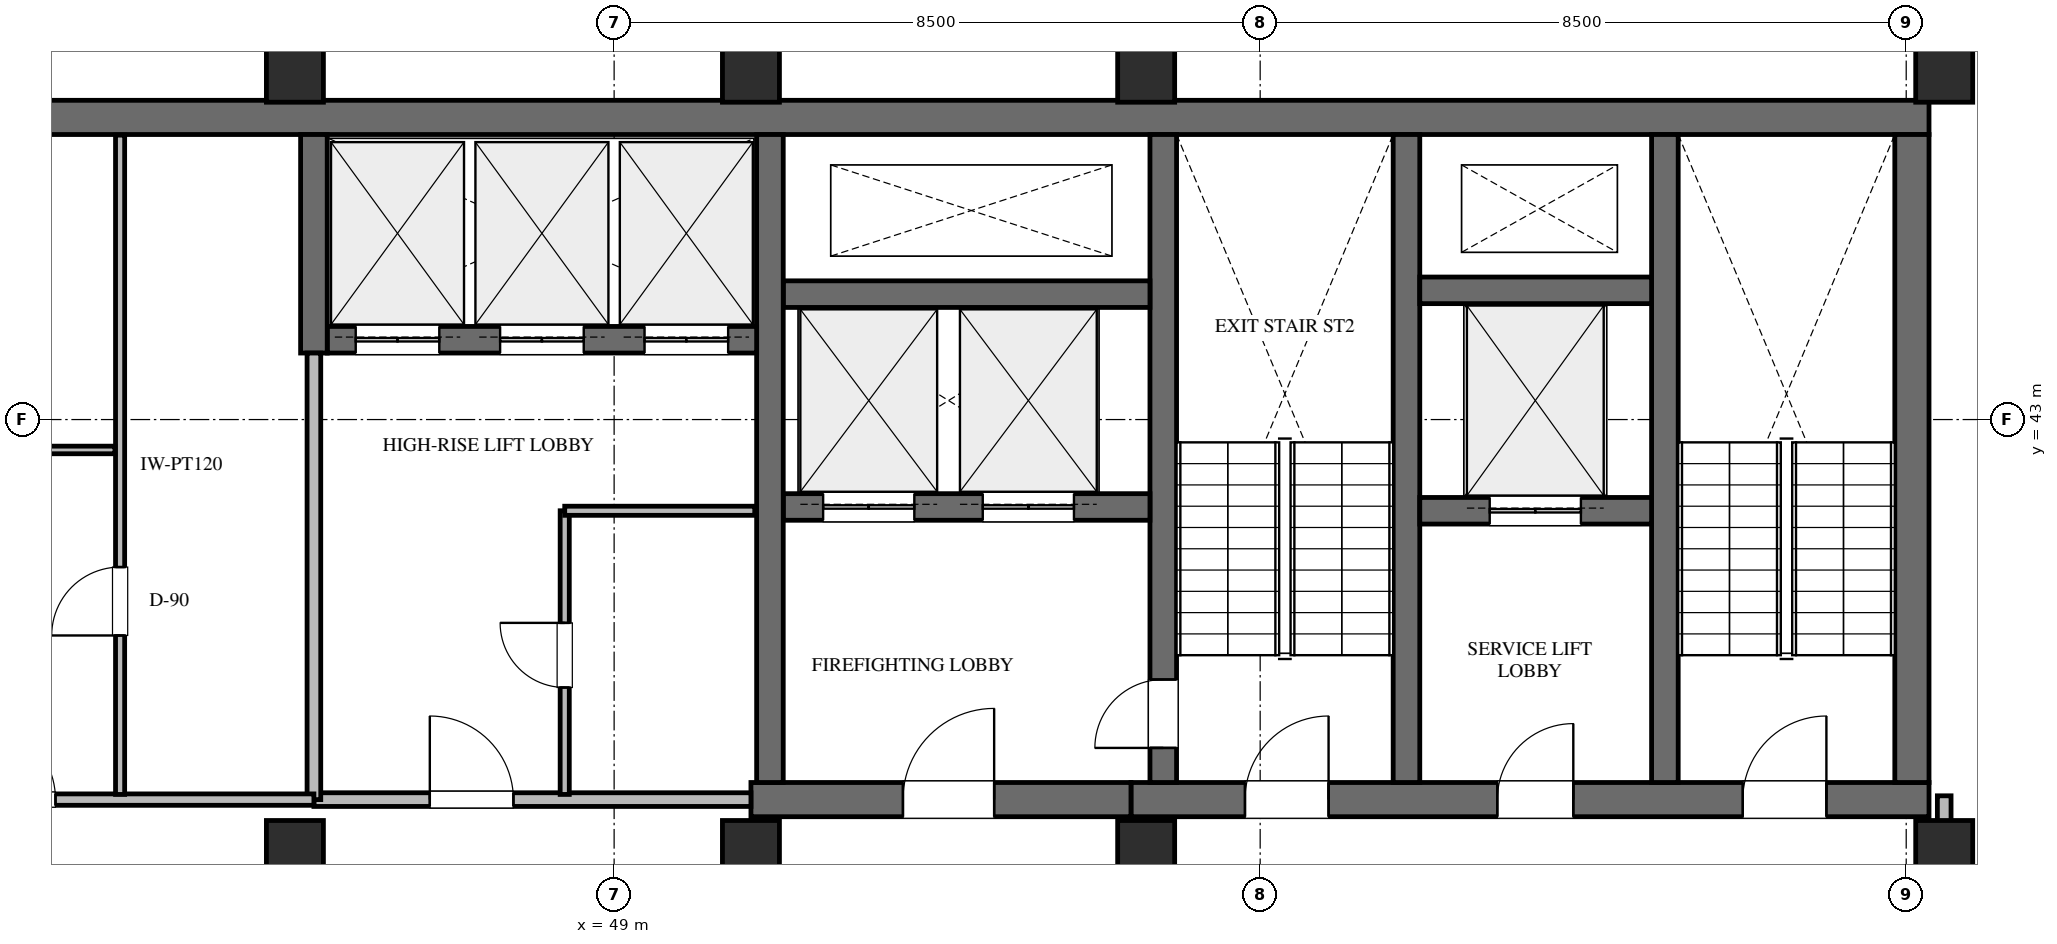
"""IFC4 building model, lengths in metres.
Left out: names, types, materials, properties, quantities, classifications, styles, units other than length and angle.
Written with IfcOpenShell. Run it as: python <this file> out.ifc"""

import sys

from ifc_helpers import new_model, si_unit, direction, frame, frame_2d, origin, origin_2d, place, context, subcontext, project, spatial, rectangle, extrude, element, fill, save


model = new_model("IFC4")
c1 = context("Model", 3, precision=1e-05, world=origin(), true_north=direction((0.0, 1.0)))
c2 = subcontext(c1, "Body", "Model", "MODEL_VIEW")
j1 = project(units=[si_unit("LENGTHUNIT", "METRE"), si_unit("PLANEANGLEUNIT", "RADIAN")], contexts=[c1])
p1 = place(None, origin())
s1 = spatial("IfcSite", under=j1, at=p1, CompositionType="ELEMENT")
p2 = place(p1, origin())
s2 = spatial("IfcBuilding", under=s1, at=p2, CompositionType="ELEMENT")
p3 = place(p2, frame((0.0, 0.0, 231.0)))
s3 = spatial("IfcBuildingStorey", under=s2, at=p3, CompositionType="ELEMENT", Elevation=231.0)
p4 = place(p3, frame((22.9, 46.975, 0.0), z_axis=(0.0, 0.0, 1.0), x_axis=(1.0, 0.0, 0.0)))
e1 = element("IfcWall", 1, at=p4, inside=s3, PredefinedType="SHEAR", context=c2, shape_type="SweptSolid", body=[
    extrude(rectangle(XDim=43.4, YDim=0.45, at=frame_2d((21.7, 0.0))), origin(), (0.0, 0.0, 1.0), 3.6),
])
p5 = place(p3, frame((55.8, 38.0, 0.0), z_axis=(0.0, 0.0, 1.0), x_axis=(1.0, 0.0, 0.0)))
e2 = element("IfcWall", 2, at=p5, inside=s3, PredefinedType="SHEAR", context=c2, shape_type="SweptSolid", body=[
    extrude(rectangle(XDim=10.5, YDim=0.45, at=frame_2d((5.25, 0.0))), origin(), (0.0, 0.0, 1.0), 3.6),
])
p6 = place(p5, frame((1.5, 0.0, 0.0)))
e3 = element("IfcOpeningElement", 3, at=p6, cuts=e2, PredefinedType="OPENING", context=c2, shape_type="SweptSolid", body=[
    extrude(rectangle(XDim=1.1, YDim=2.2, at=frame_2d((0.55, 1.1))), frame((0.0, 0.235, 0.0), z_axis=(0.0, -1.0, 0.0), x_axis=(1.0, 0.0, 0.0)), (0.0, 0.0, 1.0), 0.47),
])
p7 = place(p5, frame((4.82, 0.0, 0.0)))
e4 = element("IfcOpeningElement", 4, at=p7, cuts=e2, PredefinedType="OPENING", context=c2, shape_type="SweptSolid", body=[
    extrude(rectangle(XDim=1.0, YDim=2.15, at=frame_2d((0.5, 1.075))), frame((0.0, 0.235, 0.0), z_axis=(0.0, -1.0, 0.0), x_axis=(1.0, 0.0, 0.0)), (0.0, 0.0, 1.0), 0.47),
])
p8 = place(p5, frame((8.05, 0.0, 0.0)))
e5 = element("IfcOpeningElement", 5, at=p8, cuts=e2, PredefinedType="OPENING", context=c2, shape_type="SweptSolid", body=[
    extrude(rectangle(XDim=1.1, YDim=2.2, at=frame_2d((0.55, 1.1))), frame((0.0, 0.235, 0.0), z_axis=(0.0, -1.0, 0.0), x_axis=(1.0, 0.0, 0.0)), (0.0, 0.0, 1.0), 0.47),
])
p9 = place(p3, frame((66.075, 38.225, 0.0), z_axis=(0.0, 0.0, 1.0), x_axis=(0.0, 1.0, 0.0)))
e6 = element("IfcWall", 6, at=p9, inside=s3, PredefinedType="SHEAR", context=c2, shape_type="SweptSolid", body=[
    extrude(rectangle(XDim=8.525, YDim=0.45, at=frame_2d((4.262, 0.0))), origin(), (0.0, 0.0, 1.0), 3.6),
])
for number, where, z_axis, x_axis in (
    (7, (62.825, 38.225, 0.0), (0.0, 0.0, 1.0), (0.0, 1.0, 0.0)),
    (8, (59.425, 38.225, 0.0), (0.0, 0.0, 1.0), (0.0, 1.0, 0.0)),
):
    element("IfcWall", number, at=place(p3, frame(where, z_axis=z_axis, x_axis=x_axis)), inside=s3, PredefinedType="SHEAR", context=c2, shape_type="SweptSolid", body=[
        extrude(rectangle(XDim=8.525, YDim=0.35, at=frame_2d((4.262, 0.0))), origin(), (0.0, 0.0, 1.0), 3.6),
    ])
p10 = place(p3, frame((56.225, 38.225, 0.0), z_axis=(0.0, 0.0, 1.0), x_axis=(0.0, 1.0, 0.0)))
e9 = element("IfcWall", 9, at=p10, inside=s3, PredefinedType="SHEAR", context=c2, shape_type="SweptSolid", body=[
    extrude(rectangle(XDim=8.525, YDim=0.35, at=frame_2d((4.262, 0.0))), origin(), (0.0, 0.0, 1.0), 3.6),
])
p11 = place(p10, frame((0.455, 0.0, 0.0)))
e10 = element("IfcOpeningElement", 10, at=p11, cuts=e9, PredefinedType="OPENING", context=c2, shape_type="SweptSolid", body=[
    extrude(rectangle(XDim=0.9, YDim=2.15, at=frame_2d((0.45, 1.075))), frame((0.0, 0.185, 0.0), z_axis=(0.0, -1.0, 0.0), x_axis=(1.0, 0.0, 0.0)), (0.0, 0.0, 1.0), 0.37),
])
p12 = place(p3, frame((59.6, 41.8, 0.0), z_axis=(0.0, 0.0, 1.0), x_axis=(1.0, 0.0, 0.0)))
e11 = element("IfcWall", 11, at=p12, inside=s3, PredefinedType="SHEAR", context=c2, shape_type="SweptSolid", body=[
    extrude(rectangle(XDim=3.05, YDim=0.35, at=frame_2d((1.525, 0.0))), origin(), (0.0, 0.0, 1.0), 3.6),
])
p13 = place(p12, frame((0.92, 0.0, 0.0)))
e12 = element("IfcOpeningElement", 12, at=p13, cuts=e11, PredefinedType="OPENING", context=c2, shape_type="SweptSolid", body=[
    extrude(rectangle(XDim=1.2, YDim=2.2, at=frame_2d((0.6, 1.1))), frame((0.0, 0.185, 0.0), z_axis=(0.0, -1.0, 0.0), x_axis=(1.0, 0.0, 0.0)), (0.0, 0.0, 1.0), 0.37),
])
p14 = place(p3, frame((59.6, 44.7, 0.0), z_axis=(0.0, 0.0, 1.0), x_axis=(1.0, 0.0, 0.0)))
e13 = element("IfcWall", 13, at=p14, inside=s3, PredefinedType="SHEAR", context=c2, shape_type="SweptSolid", body=[
    extrude(rectangle(XDim=3.05, YDim=0.35, at=frame_2d((1.525, 0.0))), origin(), (0.0, 0.0, 1.0), 3.6),
])
p15 = place(p3, frame((50.8, 38.0, 0.0), z_axis=(0.0, 0.0, 1.0), x_axis=(1.0, 0.0, 0.0)))
e14 = element("IfcWall", 14, at=p15, inside=s3, PredefinedType="SHEAR", context=c2, shape_type="SweptSolid", body=[
    extrude(rectangle(XDim=5.0, YDim=0.45, at=frame_2d((2.5, 0.0))), origin(), (0.0, 0.0, 1.0), 3.6),
])
p16 = place(p15, frame((2.0, 0.0, 0.0)))
e15 = element("IfcOpeningElement", 15, at=p16, cuts=e14, PredefinedType="OPENING", context=c2, shape_type="SweptSolid", body=[
    extrude(rectangle(XDim=1.2, YDim=2.2, at=frame_2d((0.6, 1.1))), frame((0.0, 0.235, 0.0), z_axis=(0.0, -1.0, 0.0), x_axis=(1.0, 0.0, 0.0)), (0.0, 0.0, 1.0), 0.47),
])
p17 = place(p3, frame((51.225, 41.85, 0.0), z_axis=(0.0, 0.0, 1.0), x_axis=(1.0, 0.0, 0.0)))
e16 = element("IfcWall", 16, at=p17, inside=s3, PredefinedType="SHEAR", context=c2, shape_type="SweptSolid", body=[
    extrude(rectangle(XDim=4.825, YDim=0.35, at=frame_2d((2.413, 0.0))), origin(), (0.0, 0.0, 1.0), 3.6),
])
p18 = place(p17, frame((0.525, 0.0, 0.0)))
e17 = element("IfcOpeningElement", 17, at=p18, cuts=e16, PredefinedType="OPENING", context=c2, shape_type="SweptSolid", body=[
    extrude(rectangle(XDim=1.2, YDim=2.2, at=frame_2d((0.6, 1.1))), frame((0.0, 0.185, 0.0), z_axis=(0.0, -1.0, 0.0), x_axis=(1.0, 0.0, 0.0)), (0.0, 0.0, 1.0), 0.37),
])
p19 = place(p17, frame((2.625, 0.0, 0.0)))
e18 = element("IfcOpeningElement", 18, at=p19, cuts=e16, PredefinedType="OPENING", context=c2, shape_type="SweptSolid", body=[
    extrude(rectangle(XDim=1.2, YDim=2.2, at=frame_2d((0.6, 1.1))), frame((0.0, 0.185, 0.0), z_axis=(0.0, -1.0, 0.0), x_axis=(1.0, 0.0, 0.0)), (0.0, 0.0, 1.0), 0.37),
])
p20 = place(p3, frame((51.225, 44.65, 0.0), z_axis=(0.0, 0.0, 1.0), x_axis=(1.0, 0.0, 0.0)))
e19 = element("IfcWall", 19, at=p20, inside=s3, PredefinedType="SHEAR", context=c2, shape_type="SweptSolid", body=[
    extrude(rectangle(XDim=4.825, YDim=0.35, at=frame_2d((2.413, 0.0))), origin(), (0.0, 0.0, 1.0), 3.6),
])
p21 = place(p3, frame((51.05, 38.225, 0.0), z_axis=(0.0, 0.0, 1.0), x_axis=(0.0, 1.0, 0.0)))
e20 = element("IfcWall", 20, at=p21, inside=s3, PredefinedType="SHEAR", context=c2, shape_type="SweptSolid", body=[
    extrude(rectangle(XDim=8.525, YDim=0.35, at=frame_2d((4.262, 0.0))), origin(), (0.0, 0.0, 1.0), 3.6),
])
p22 = place(p3, frame((45.225, 44.05, 0.0), z_axis=(0.0, 0.0, 1.0), x_axis=(1.0, 0.0, 0.0)))
e21 = element("IfcWall", 21, at=p22, inside=s3, PredefinedType="SHEAR", context=c2, shape_type="SweptSolid", body=[
    extrude(rectangle(XDim=5.65, YDim=0.35, at=frame_2d((2.825, 0.0))), origin(), (0.0, 0.0, 1.0), 3.6),
])
p23 = place(p22, frame((0.375, 0.0, 0.0)))
e22 = element("IfcOpeningElement", 22, at=p23, cuts=e21, PredefinedType="OPENING", context=c2, shape_type="SweptSolid", body=[
    extrude(rectangle(XDim=1.1, YDim=2.2, at=frame_2d((0.55, 1.1))), frame((0.0, 0.185, 0.0), z_axis=(0.0, -1.0, 0.0), x_axis=(1.0, 0.0, 0.0)), (0.0, 0.0, 1.0), 0.37),
])
p24 = place(p22, frame((2.275, 0.0, 0.0)))
e23 = element("IfcOpeningElement", 23, at=p24, cuts=e21, PredefinedType="OPENING", context=c2, shape_type="SweptSolid", body=[
    extrude(rectangle(XDim=1.1, YDim=2.2, at=frame_2d((0.55, 1.1))), frame((0.0, 0.185, 0.0), z_axis=(0.0, -1.0, 0.0), x_axis=(1.0, 0.0, 0.0)), (0.0, 0.0, 1.0), 0.37),
])
p25 = place(p22, frame((4.175, 0.0, 0.0)))
e24 = element("IfcOpeningElement", 24, at=p25, cuts=e21, PredefinedType="OPENING", context=c2, shape_type="SweptSolid", body=[
    extrude(rectangle(XDim=1.1, YDim=2.2, at=frame_2d((0.55, 1.1))), frame((0.0, 0.185, 0.0), z_axis=(0.0, -1.0, 0.0), x_axis=(1.0, 0.0, 0.0)), (0.0, 0.0, 1.0), 0.37),
])
p26 = place(p3, frame((45.05, 43.875, 0.0), z_axis=(0.0, 0.0, 1.0), x_axis=(0.0, 1.0, 0.0)))
e25 = element("IfcWall", 25, at=p26, inside=s3, PredefinedType="SHEAR", context=c2, shape_type="SweptSolid", body=[
    extrude(rectangle(XDim=2.875, YDim=0.35, at=frame_2d((1.438, 0.0))), origin(), (0.0, 0.0, 1.0), 3.6),
])
for number, where, z_axis, x_axis in (
    (26, (66.5, 47.55, 0.0), (0.0, 0.0, 1.0), (1.0, 0.0, 0.0)),
    (27, (56.0, 47.55, 0.0), (0.0, 0.0, 1.0), (1.0, 0.0, 0.0)),
    (28, (66.5, 37.35, 0.0), (0.0, 0.0, 1.0), (1.0, 0.0, 0.0)),
    (29, (56.0, 37.35, 0.0), (0.0, 0.0, 1.0), (1.0, 0.0, 0.0)),
    (30, (50.8, 47.55, 0.0), (0.0, 0.0, 1.0), (1.0, 0.0, 0.0)),
    (31, (50.8, 37.35, 0.0), (0.0, 0.0, 1.0), (1.0, 0.0, 0.0)),
    (32, (44.8, 37.35, 0.0), (0.0, 0.0, 1.0), (1.0, 0.0, 0.0)),
    (33, (44.8, 47.55, 0.0), (0.0, 0.0, 1.0), (1.0, 0.0, 0.0)),
):
    element("IfcColumn", number, at=place(p3, frame(where, z_axis=z_axis, x_axis=x_axis)), inside=s3, PredefinedType="COLUMN", context=c2, shape_type="SweptSolid", body=[
        extrude(rectangle(XDim=0.75, YDim=0.75, at=origin_2d()), origin(), (0.0, 0.0, 1.0), 3.6),
    ])
p27 = place(p3, frame((45.05, 38.0, 0.0), z_axis=(0.0, 0.0, 1.0), x_axis=(1.0, 0.0, 0.0)))
e34 = element("IfcWall", 34, at=p27, inside=s3, PredefinedType="STANDARD", context=c2, shape_type="SweptSolid", body=[
    extrude(rectangle(XDim=5.75, YDim=0.18, at=frame_2d((2.875, 0.0))), origin(), (0.0, 0.0, 1.0), 2.664),
])
p28 = place(p27, frame((1.525, 0.0, 0.0)))
e35 = element("IfcOpeningElement", 35, at=p28, cuts=e34, PredefinedType="OPENING", context=c2, shape_type="SweptSolid", body=[
    extrude(rectangle(XDim=1.1, YDim=2.2, at=frame_2d((0.55, 1.1))), frame((0.0, 0.1, 0.0), z_axis=(0.0, -1.0, 0.0), x_axis=(1.0, 0.0, 0.0)), (0.0, 0.0, 1.0), 0.2),
])
p29 = place(p3, frame((48.35, 38.068, 0.0), z_axis=(0.0, 0.0, 1.0), x_axis=(0.0, 1.0, 0.0)))
e36 = element("IfcWall", 36, at=p29, inside=s3, PredefinedType="PARTITIONING", context=c2, shape_type="SweptSolid", body=[
    extrude(rectangle(XDim=3.732, YDim=0.12, at=frame_2d((1.866, 0.0))), origin(), (0.0, 0.0, 1.0), 3.36),
])
p30 = place(p29, frame((1.407, 0.0, 0.0)))
e37 = element("IfcOpeningElement", 37, at=p30, cuts=e36, PredefinedType="OPENING", context=c2, shape_type="SweptSolid", body=[
    extrude(rectangle(XDim=0.85, YDim=2.1, at=frame_2d((0.425, 1.05))), frame((0.0, 0.07, 0.0), z_axis=(0.0, -1.0, 0.0), x_axis=(1.0, 0.0, 0.0)), (0.0, 0.0, 1.0), 0.14),
])
p31 = place(p3, frame((48.35, 41.8, 0.0), z_axis=(0.0, 0.0, 1.0), x_axis=(1.0, 0.0, 0.0)))
e38 = element("IfcWall", 38, at=p31, inside=s3, PredefinedType="PARTITIONING", context=c2, shape_type="SweptSolid", body=[
    extrude(rectangle(XDim=2.5, YDim=0.12, at=frame_2d((1.25, 0.0))), origin(), (0.0, 0.0, 1.0), 2.664),
])
p32 = place(p3, frame((45.05, 38.0, 0.0), z_axis=(0.0, 0.0, 1.0), x_axis=(0.0, 1.0, 0.0)))
e39 = element("IfcWall", 39, at=p32, inside=s3, PredefinedType="STANDARD", context=c2, shape_type="SweptSolid", body=[
    extrude(rectangle(XDim=5.875, YDim=0.18, at=frame_2d((2.938, 0.0))), origin(), (0.0, 0.0, 1.0), 2.664),
])
p33 = place(p3, frame((27.05, 38.0, 0.0), z_axis=(0.0, 0.0, 1.0), x_axis=(1.0, 0.0, 0.0)))
e40 = element("IfcWall", 40, at=p33, inside=s3, PredefinedType="PARTITIONING", context=c2, shape_type="SweptSolid", body=[
    extrude(rectangle(XDim=18.0, YDim=0.15, at=frame_2d((9.0, 0.0))), origin(), (0.0, 0.0, 1.0), 2.664),
])
p34 = place(p33, frame((13.55, 0.0, 0.0)))
e41 = element("IfcOpeningElement", 41, at=p34, cuts=e40, PredefinedType="OPENING", context=c2, shape_type="SweptSolid", body=[
    extrude(rectangle(XDim=1.05, YDim=2.2, at=frame_2d((0.525, 1.1))), frame((0.0, 0.085, 0.0), z_axis=(0.0, -1.0, 0.0), x_axis=(1.0, 0.0, 0.0)), (0.0, 0.0, 1.0), 0.17),
])
p35 = place(p3, frame((42.5, 38.068, 0.0), z_axis=(0.0, 0.0, 1.0), x_axis=(0.0, 1.0, 0.0)))
e42 = element("IfcWall", 42, at=p35, inside=s3, PredefinedType="PARTITIONING", context=c2, shape_type="SweptSolid", body=[
    extrude(rectangle(XDim=8.674, YDim=0.12, at=frame_2d((4.337, 0.0))), origin(), (0.0, 0.0, 1.0), 3.36),
])
p36 = place(p35, frame((2.091, 0.0, 0.0)))
e43 = element("IfcOpeningElement", 43, at=p36, cuts=e42, PredefinedType="OPENING", context=c2, shape_type="SweptSolid", body=[
    extrude(rectangle(XDim=0.9, YDim=2.1, at=frame_2d((0.45, 1.05))), frame((0.0, 0.07, 0.0), z_axis=(0.0, -1.0, 0.0), x_axis=(1.0, 0.0, 0.0)), (0.0, 0.0, 1.0), 0.14),
])
p37 = place(p3, frame((26.918, 42.6, 0.0), z_axis=(0.0, 0.0, 1.0), x_axis=(1.0, 0.0, 0.0)))
e44 = element("IfcWall", 44, at=p37, inside=s3, PredefinedType="PARTITIONING", context=c2, shape_type="SweptSolid", body=[
    extrude(rectangle(XDim=15.514, YDim=0.1, at=frame_2d((7.757, 0.0))), origin(), (0.0, 0.0, 1.0), 2.664),
])
p38 = place(p37, frame((7.307, 0.0, 0.0)))
e45 = element("IfcOpeningElement", 45, at=p38, cuts=e44, PredefinedType="OPENING", context=c2, shape_type="SweptSolid", body=[
    extrude(rectangle(XDim=0.9, YDim=2.1, at=frame_2d((0.45, 1.05))), frame((0.0, 0.06, 0.0), z_axis=(0.0, -1.0, 0.0), x_axis=(1.0, 0.0, 0.0)), (0.0, 0.0, 1.0), 0.12),
])
p39 = place(p3, frame((66.5, 34.468, 0.0), z_axis=(0.0, 0.0, 1.0), x_axis=(0.0, 1.0, 0.0)))
e46 = element("IfcWall", 46, at=p39, inside=s3, PredefinedType="STANDARD", context=c2, shape_type="SweptSolid", body=[
    extrude(rectangle(XDim=3.582, YDim=0.18, at=frame_2d((1.791, 0.0))), origin(), (0.0, 0.0, 1.0), 2.664),
])
p40 = place(p6, origin())
e47 = element("IfcDoor", 47, at=p40, inside=s3, OperationType="SINGLE_SWING_RIGHT", PredefinedType="DOOR", context=c2, shape_type="SweptSolid", body=[
    extrude(rectangle(XDim=1.1, YDim=2.2, at=frame_2d((0.55, 1.1))), frame((0.0, 0.025, 0.0), z_axis=(0.0, -1.0, 0.0), x_axis=(1.0, 0.0, 0.0)), (0.0, 0.0, 1.0), 0.05),
])
fill(e3, e47)
p41 = place(p7, origin())
e48 = element("IfcDoor", 48, at=p41, inside=s3, OperationType="SINGLE_SWING_RIGHT", PredefinedType="DOOR", context=c2, shape_type="SweptSolid", body=[
    extrude(rectangle(XDim=1.0, YDim=2.15, at=frame_2d((0.5, 1.075))), frame((0.0, 0.025, 0.0), z_axis=(0.0, -1.0, 0.0), x_axis=(1.0, 0.0, 0.0)), (0.0, 0.0, 1.0), 0.05),
])
fill(e4, e48)
p42 = place(p8, origin())
e49 = element("IfcDoor", 49, at=p42, inside=s3, OperationType="SINGLE_SWING_RIGHT", PredefinedType="DOOR", context=c2, shape_type="SweptSolid", body=[
    extrude(rectangle(XDim=1.1, YDim=2.2, at=frame_2d((0.55, 1.1))), frame((0.0, 0.025, 0.0), z_axis=(0.0, -1.0, 0.0), x_axis=(1.0, 0.0, 0.0)), (0.0, 0.0, 1.0), 0.05),
])
fill(e5, e49)
p43 = place(p16, origin())
e50 = element("IfcDoor", 50, at=p43, inside=s3, OperationType="SINGLE_SWING_RIGHT", PredefinedType="DOOR", context=c2, shape_type="SweptSolid", body=[
    extrude(rectangle(XDim=1.2, YDim=2.2, at=frame_2d((0.6, 1.1))), frame((0.0, 0.025, 0.0), z_axis=(0.0, -1.0, 0.0), x_axis=(1.0, 0.0, 0.0)), (0.0, 0.0, 1.0), 0.05),
])
fill(e15, e50)
p44 = place(p11, origin())
e51 = element("IfcDoor", 51, at=p44, inside=s3, OperationType="SINGLE_SWING_LEFT", PredefinedType="DOOR", context=c2, shape_type="SweptSolid", body=[
    extrude(rectangle(XDim=0.9, YDim=2.15, at=frame_2d((0.45, 1.075))), frame((0.0, 0.025, 0.0), z_axis=(0.0, -1.0, 0.0), x_axis=(1.0, 0.0, 0.0)), (0.0, 0.0, 1.0), 0.05),
])
fill(e10, e51)
p45 = place(p23, origin())
e52 = element("IfcDoor", 52, at=p45, inside=s3, OperationType="DOUBLE_DOOR_SLIDING", PredefinedType="DOOR", context=c2, shape_type="SweptSolid", body=[
    extrude(rectangle(XDim=1.1, YDim=2.2, at=frame_2d((0.55, 1.1))), frame((0.0, 0.025, 0.0), z_axis=(0.0, -1.0, 0.0), x_axis=(1.0, 0.0, 0.0)), (0.0, 0.0, 1.0), 0.05),
])
fill(e22, e52)
p46 = place(p24, origin())
e53 = element("IfcDoor", 53, at=p46, inside=s3, OperationType="DOUBLE_DOOR_SLIDING", PredefinedType="DOOR", context=c2, shape_type="SweptSolid", body=[
    extrude(rectangle(XDim=1.1, YDim=2.2, at=frame_2d((0.55, 1.1))), frame((0.0, 0.025, 0.0), z_axis=(0.0, -1.0, 0.0), x_axis=(1.0, 0.0, 0.0)), (0.0, 0.0, 1.0), 0.05),
])
fill(e23, e53)
p47 = place(p25, origin())
e54 = element("IfcDoor", 54, at=p47, inside=s3, OperationType="DOUBLE_DOOR_SLIDING", PredefinedType="DOOR", context=c2, shape_type="SweptSolid", body=[
    extrude(rectangle(XDim=1.1, YDim=2.2, at=frame_2d((0.55, 1.1))), frame((0.0, 0.025, 0.0), z_axis=(0.0, -1.0, 0.0), x_axis=(1.0, 0.0, 0.0)), (0.0, 0.0, 1.0), 0.05),
])
fill(e24, e54)
p48 = place(p18, origin())
e55 = element("IfcDoor", 55, at=p48, inside=s3, OperationType="DOUBLE_DOOR_SLIDING", PredefinedType="DOOR", context=c2, shape_type="SweptSolid", body=[
    extrude(rectangle(XDim=1.2, YDim=2.2, at=frame_2d((0.6, 1.1))), frame((0.0, 0.025, 0.0), z_axis=(0.0, -1.0, 0.0), x_axis=(1.0, 0.0, 0.0)), (0.0, 0.0, 1.0), 0.05),
])
fill(e17, e55)
p49 = place(p19, origin())
e56 = element("IfcDoor", 56, at=p49, inside=s3, OperationType="DOUBLE_DOOR_SLIDING", PredefinedType="DOOR", context=c2, shape_type="SweptSolid", body=[
    extrude(rectangle(XDim=1.2, YDim=2.2, at=frame_2d((0.6, 1.1))), frame((0.0, 0.025, 0.0), z_axis=(0.0, -1.0, 0.0), x_axis=(1.0, 0.0, 0.0)), (0.0, 0.0, 1.0), 0.05),
])
fill(e18, e56)
p50 = place(p13, origin())
e57 = element("IfcDoor", 57, at=p50, inside=s3, OperationType="DOUBLE_DOOR_SLIDING", PredefinedType="DOOR", context=c2, shape_type="SweptSolid", body=[
    extrude(rectangle(XDim=1.2, YDim=2.2, at=frame_2d((0.6, 1.1))), frame((0.0, 0.025, 0.0), z_axis=(0.0, -1.0, 0.0), x_axis=(1.0, 0.0, 0.0)), (0.0, 0.0, 1.0), 0.05),
])
fill(e12, e57)
p51 = place(p28, origin())
e58 = element("IfcDoor", 58, at=p51, inside=s3, OperationType="SINGLE_SWING_LEFT", PredefinedType="DOOR", context=c2, shape_type="SweptSolid", body=[
    extrude(rectangle(XDim=1.1, YDim=2.2, at=frame_2d((0.55, 1.1))), frame((0.0, 0.025, 0.0), z_axis=(0.0, -1.0, 0.0), x_axis=(1.0, 0.0, 0.0)), (0.0, 0.0, 1.0), 0.05),
])
fill(e35, e58)
p52 = place(p30, origin())
e59 = element("IfcDoor", 59, at=p52, inside=s3, OperationType="SINGLE_SWING_RIGHT", PredefinedType="DOOR", context=c2, shape_type="SweptSolid", body=[
    extrude(rectangle(XDim=0.85, YDim=2.1, at=frame_2d((0.425, 1.05))), frame((0.0, 0.025, 0.0), z_axis=(0.0, -1.0, 0.0), x_axis=(1.0, 0.0, 0.0)), (0.0, 0.0, 1.0), 0.05),
])
fill(e37, e59)
p53 = place(p34, origin())
e60 = element("IfcDoor", 60, at=p53, inside=s3, OperationType="SINGLE_SWING_LEFT", PredefinedType="DOOR", context=c2, shape_type="SweptSolid", body=[
    extrude(rectangle(XDim=1.05, YDim=2.2, at=frame_2d((0.525, 1.1))), frame((0.0, 0.025, 0.0), z_axis=(0.0, -1.0, 0.0), x_axis=(1.0, 0.0, 0.0)), (0.0, 0.0, 1.0), 0.05),
])
fill(e41, e60)
p54 = place(p36, origin())
e61 = element("IfcDoor", 61, at=p54, inside=s3, OperationType="SINGLE_SWING_LEFT", PredefinedType="DOOR", context=c2, shape_type="SweptSolid", body=[
    extrude(rectangle(XDim=0.9, YDim=2.1, at=frame_2d((0.45, 1.05))), frame((0.0, 0.025, 0.0), z_axis=(0.0, -1.0, 0.0), x_axis=(1.0, 0.0, 0.0)), (0.0, 0.0, 1.0), 0.05),
])
fill(e43, e61)
save(model, sys.argv[1])
